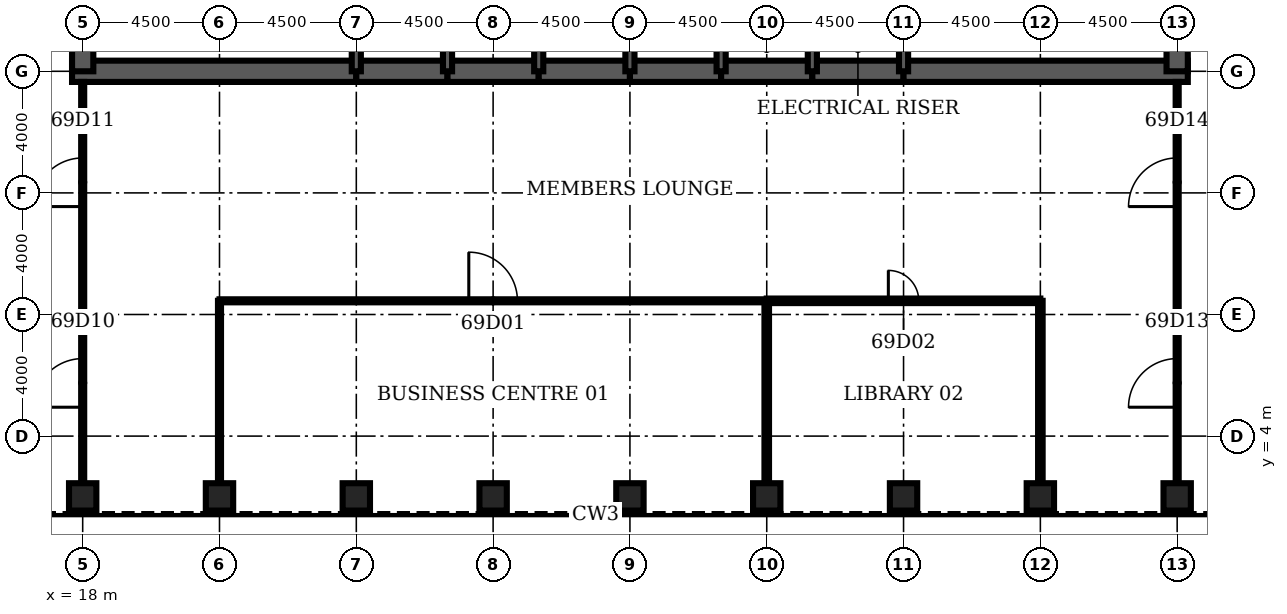
"""IFC4 building model, lengths in metres.
Left out: names, types, materials, properties, quantities, classifications, styles, units other than length and angle.
Written with IfcOpenShell. Run it as: python <this file> out.ifc"""

import sys

from ifc_helpers import new_model, si_unit, direction, frame, frame_2d, origin, origin_2d, place, context, subcontext, project, spatial, rectangle, hollow_rectangle, extrude, element, fill, save


model = new_model("IFC4")
c1 = context("Model", 3, precision=1e-05, world=origin(), true_north=direction((0.0, 1.0)))
c2 = subcontext(c1, "Body", "Model", "MODEL_VIEW")
j1 = project(units=[si_unit("LENGTHUNIT", "METRE"), si_unit("PLANEANGLEUNIT", "RADIAN")], contexts=[c1])
p1 = place(None, origin())
s1 = spatial("IfcSite", under=j1, at=p1, CompositionType="ELEMENT")
p2 = place(p1, origin())
s2 = spatial("IfcBuilding", under=s1, at=p2, CompositionType="ELEMENT")
p3 = place(p2, frame((0.0, 0.0, 304.7)))
s3 = spatial("IfcBuildingStorey", under=s2, at=p3, CompositionType="ELEMENT", Elevation=304.7)
for number, where, z_axis, x_axis in (
    (1, (18.0, 2.0, 0.0), (0.0, 0.0, 1.0), (0.0, 1.0, 0.0)),
    (2, (22.5, 2.0, 0.0), (0.0, 0.0, 1.0), (0.0, 1.0, 0.0)),
    (3, (27.0, 2.0, 0.0), (0.0, 0.0, 1.0), (0.0, 1.0, 0.0)),
    (4, (31.5, 2.0, 0.0), (0.0, 0.0, 1.0), (0.0, 1.0, 0.0)),
    (5, (36.0, 2.0, 0.0), (0.0, 0.0, 1.0), (0.0, 1.0, 0.0)),
    (6, (40.5, 2.0, 0.0), (0.0, 0.0, 1.0), (0.0, 1.0, 0.0)),
    (7, (45.0, 2.0, 0.0), (0.0, 0.0, 1.0), (0.0, 1.0, 0.0)),
    (8, (49.5, 2.0, 0.0), (0.0, 0.0, 1.0), (0.0, 1.0, 0.0)),
    (9, (54.0, 2.0, 0.0), (0.0, 0.0, 1.0), (0.0, 1.0, 0.0)),
):
    element("IfcColumn", number, at=place(p3, frame(where, z_axis=z_axis, x_axis=x_axis)), inside=s3, PredefinedType="COLUMN", context=c2, shape_type="SweptSolid", body=[
        extrude(hollow_rectangle(XDim=0.9, YDim=0.9, WallThickness=0.06, at=origin_2d()), origin(), (0.0, 0.0, 1.0), 4.2),
    ])
p4 = place(p3, frame((17.65, 16.0, 0.0), z_axis=(0.0, 0.0, 1.0), x_axis=(1.0, 0.0, 0.0)))
e10 = element("IfcWall", 10, at=p4, inside=s3, PredefinedType="SHEAR", context=c2, shape_type="SweptSolid", body=[
    extrude(rectangle(XDim=9.35, YDim=0.7, at=frame_2d((4.675, 0.0))), origin(), (0.0, 0.0, 1.0), 4.2),
])
for number, where, z_axis, x_axis in (
    (11, (27.0, 16.0, 0.0), (0.0, 0.0, 1.0), (1.0, 0.0, 0.0)),
    (12, (30.0, 16.0, 0.0), (0.0, 0.0, 1.0), (1.0, 0.0, 0.0)),
    (13, (33.0, 16.0, 0.0), (0.0, 0.0, 1.0), (1.0, 0.0, 0.0)),
    (14, (36.0, 16.0, 0.0), (0.0, 0.0, 1.0), (1.0, 0.0, 0.0)),
    (15, (39.0, 16.0, 0.0), (0.0, 0.0, 1.0), (1.0, 0.0, 0.0)),
    (16, (42.0, 16.0, 0.0), (0.0, 0.0, 1.0), (1.0, 0.0, 0.0)),
):
    element("IfcWall", number, at=place(p3, frame(where, z_axis=z_axis, x_axis=x_axis)), inside=s3, PredefinedType="SHEAR", context=c2, shape_type="SweptSolid", body=[
        extrude(rectangle(XDim=3.0, YDim=0.7, at=frame_2d((1.5, 0.0))), origin(), (0.0, 0.0, 1.0), 4.2),
    ])
p5 = place(p3, frame((45.0, 16.0, 0.0), z_axis=(0.0, 0.0, 1.0), x_axis=(1.0, 0.0, 0.0)))
e17 = element("IfcWall", 17, at=p5, inside=s3, PredefinedType="SHEAR", context=c2, shape_type="SweptSolid", body=[
    extrude(rectangle(XDim=9.35, YDim=0.7, at=frame_2d((4.675, 0.0))), origin(), (0.0, 0.0, 1.0), 4.2),
])
for number, where, z_axis, x_axis in (
    (18, (18.0, 19.2, 0.0), (0.0, 0.0, 1.0), (0.0, -1.0, 0.0)),
    (19, (54.0, 16.0, 0.0), (0.0, 0.0, 1.0), (0.0, 1.0, 0.0)),
):
    element("IfcWall", number, at=place(p3, frame(where, z_axis=z_axis, x_axis=x_axis)), inside=s3, PredefinedType="SHEAR", context=c2, shape_type="SweptSolid", body=[
        extrude(rectangle(XDim=3.2, YDim=0.7, at=frame_2d((1.6, 0.0))), origin(), (0.0, 0.0, 1.0), 4.2),
    ])
for number, where, z_axis, x_axis in (
    (20, (27.0, 16.0, 0.0), (0.0, 0.0, 1.0), (0.0, 1.0, 0.0)),
    (21, (30.0, 16.0, 0.0), (0.0, 0.0, 1.0), (0.0, 1.0, 0.0)),
    (22, (33.0, 16.0, 0.0), (0.0, 0.0, 1.0), (0.0, 1.0, 0.0)),
    (23, (36.0, 16.0, 0.0), (0.0, 0.0, 1.0), (0.0, 1.0, 0.0)),
    (24, (39.0, 16.0, 0.0), (0.0, 0.0, 1.0), (0.0, 1.0, 0.0)),
    (25, (42.0, 16.0, 0.0), (0.0, 0.0, 1.0), (0.0, 1.0, 0.0)),
    (26, (45.0, 16.0, 0.0), (0.0, 0.0, 1.0), (0.0, 1.0, 0.0)),
):
    element("IfcWall", number, at=place(p3, frame(where, z_axis=z_axis, x_axis=x_axis)), inside=s3, PredefinedType="SOLIDWALL", context=c2, shape_type="SweptSolid", body=[
        extrude(rectangle(XDim=3.2, YDim=0.3, at=frame_2d((1.6, 0.0))), origin(), (0.0, 0.0, 1.0), 4.2),
    ])
p6 = place(p3, frame((22.5, 8.45, 0.0), z_axis=(0.0, 0.0, 1.0), x_axis=(1.0, 0.0, 0.0)))
e27 = element("IfcWall", 27, at=p6, inside=s3, PredefinedType="PARTITIONING", context=c2, shape_type="SweptSolid", body=[
    extrude(rectangle(XDim=18.0, YDim=0.1, at=frame_2d((9.0, 0.0))), origin(), (0.0, 0.0, 1.0), 3.0),
])
p7 = place(p6, frame((8.2, 0.0, 0.0)))
e28 = element("IfcOpeningElement", 28, at=p7, cuts=e27, PredefinedType="OPENING", context=c2, shape_type="SweptSolid", body=[
    extrude(rectangle(XDim=1.6, YDim=2.1, at=frame_2d((0.8, 1.05))), frame((0.0, 0.06, 0.0), z_axis=(0.0, -1.0, 0.0), x_axis=(1.0, 0.0, 0.0)), (0.0, 0.0, 1.0), 0.12),
])
p8 = place(p3, frame((40.5, 8.45, 0.0), z_axis=(0.0, 0.0, 1.0), x_axis=(1.0, 0.0, 0.0)))
e29 = element("IfcWall", 29, at=p8, inside=s3, PredefinedType="PARTITIONING", context=c2, shape_type="SweptSolid", body=[
    extrude(rectangle(XDim=9.0, YDim=0.15, at=frame_2d((4.5, 0.0))), origin(), (0.0, 0.0, 1.0), 3.0),
])
p9 = place(p8, frame((4.0, 0.0, 0.0)))
e30 = element("IfcOpeningElement", 30, at=p9, cuts=e29, PredefinedType="OPENING", context=c2, shape_type="SweptSolid", body=[
    extrude(rectangle(XDim=1.0, YDim=2.1, at=frame_2d((0.5, 1.05))), frame((0.0, 0.085, 0.0), z_axis=(0.0, -1.0, 0.0), x_axis=(1.0, 0.0, 0.0)), (0.0, 0.0, 1.0), 0.17),
])
p10 = place(p3, frame((18.0, 2.45, 0.0), z_axis=(0.0, 0.0, 1.0), x_axis=(0.0, 1.0, 0.0)))
e31 = element("IfcWall", 31, at=p10, inside=s3, PredefinedType="PARTITIONING", context=c2, shape_type="SweptSolid", body=[
    extrude(rectangle(XDim=13.2, YDim=0.1, at=frame_2d((6.6, 0.0))), origin(), (0.0, 0.0, 1.0), 3.0),
])
p11 = place(p10, frame((2.5, 0.0, 0.0)))
e32 = element("IfcOpeningElement", 32, at=p11, cuts=e31, PredefinedType="OPENING", context=c2, shape_type="SweptSolid", body=[
    extrude(rectangle(XDim=1.6, YDim=2.1, at=frame_2d((0.8, 1.05))), frame((0.0, 0.06, 0.0), z_axis=(0.0, -1.0, 0.0), x_axis=(1.0, 0.0, 0.0)), (0.0, 0.0, 1.0), 0.12),
])
p12 = place(p10, frame((9.1, 0.0, 0.0)))
e33 = element("IfcOpeningElement", 33, at=p12, cuts=e31, PredefinedType="OPENING", context=c2, shape_type="SweptSolid", body=[
    extrude(rectangle(XDim=1.6, YDim=2.1, at=frame_2d((0.8, 1.05))), frame((0.0, 0.06, 0.0), z_axis=(0.0, -1.0, 0.0), x_axis=(1.0, 0.0, 0.0)), (0.0, 0.0, 1.0), 0.12),
])
p13 = place(p3, frame((22.5, 2.45, 0.0), z_axis=(0.0, 0.0, 1.0), x_axis=(0.0, 1.0, 0.0)))
e34 = element("IfcWall", 34, at=p13, inside=s3, PredefinedType="PARTITIONING", context=c2, shape_type="SweptSolid", body=[
    extrude(rectangle(XDim=6.0, YDim=0.1, at=frame_2d((3.0, 0.0))), origin(), (0.0, 0.0, 1.0), 3.0),
])
for number, where, z_axis, x_axis in (
    (35, (40.5, 2.45, 0.0), (0.0, 0.0, 1.0), (0.0, 1.0, 0.0)),
    (36, (49.5, 2.45, 0.0), (0.0, 0.0, 1.0), (0.0, 1.0, 0.0)),
):
    element("IfcWall", number, at=place(p3, frame(where, z_axis=z_axis, x_axis=x_axis)), inside=s3, PredefinedType="PARTITIONING", context=c2, shape_type="SweptSolid", body=[
        extrude(rectangle(XDim=6.0, YDim=0.15, at=frame_2d((3.0, 0.0))), origin(), (0.0, 0.0, 1.0), 3.0),
    ])
p14 = place(p3, frame((54.0, 2.45, 0.0), z_axis=(0.0, 0.0, 1.0), x_axis=(0.0, 1.0, 0.0)))
e37 = element("IfcWall", 37, at=p14, inside=s3, PredefinedType="PARTITIONING", context=c2, shape_type="SweptSolid", body=[
    extrude(rectangle(XDim=13.2, YDim=0.1, at=frame_2d((6.6, 0.0))), origin(), (0.0, 0.0, 1.0), 3.0),
])
p15 = place(p14, frame((2.5, 0.0, 0.0)))
e38 = element("IfcOpeningElement", 38, at=p15, cuts=e37, PredefinedType="OPENING", context=c2, shape_type="SweptSolid", body=[
    extrude(rectangle(XDim=1.6, YDim=2.1, at=frame_2d((0.8, 1.05))), frame((0.0, 0.06, 0.0), z_axis=(0.0, -1.0, 0.0), x_axis=(1.0, 0.0, 0.0)), (0.0, 0.0, 1.0), 0.12),
])
p16 = place(p14, frame((9.1, 0.0, 0.0)))
e39 = element("IfcOpeningElement", 39, at=p16, cuts=e37, PredefinedType="OPENING", context=c2, shape_type="SweptSolid", body=[
    extrude(rectangle(XDim=1.6, YDim=2.1, at=frame_2d((0.8, 1.05))), frame((0.0, 0.06, 0.0), z_axis=(0.0, -1.0, 0.0), x_axis=(1.0, 0.0, 0.0)), (0.0, 0.0, 1.0), 0.12),
])
p17 = place(p7, origin())
e40 = element("IfcDoor", 40, at=p17, inside=s3, OperationType="SINGLE_SWING_LEFT", PredefinedType="DOOR", context=c2, shape_type="SweptSolid", body=[
    extrude(rectangle(XDim=1.6, YDim=2.1, at=frame_2d((0.8, 1.05))), frame((0.0, 0.025, 0.0), z_axis=(0.0, -1.0, 0.0), x_axis=(1.0, 0.0, 0.0)), (0.0, 0.0, 1.0), 0.05),
])
fill(e28, e40)
p18 = place(p9, origin())
e41 = element("IfcDoor", 41, at=p18, inside=s3, OperationType="SINGLE_SWING_LEFT", PredefinedType="DOOR", context=c2, shape_type="SweptSolid", body=[
    extrude(rectangle(XDim=1.0, YDim=2.1, at=frame_2d((0.5, 1.05))), frame((0.0, 0.025, 0.0), z_axis=(0.0, -1.0, 0.0), x_axis=(1.0, 0.0, 0.0)), (0.0, 0.0, 1.0), 0.05),
])
fill(e30, e41)
p19 = place(p11, origin())
e42 = element("IfcDoor", 42, at=p19, inside=s3, OperationType="SINGLE_SWING_LEFT", PredefinedType="DOOR", context=c2, shape_type="SweptSolid", body=[
    extrude(rectangle(XDim=1.6, YDim=2.1, at=frame_2d((0.8, 1.05))), frame((0.0, 0.025, 0.0), z_axis=(0.0, -1.0, 0.0), x_axis=(1.0, 0.0, 0.0)), (0.0, 0.0, 1.0), 0.05),
])
fill(e32, e42)
p20 = place(p12, origin())
e43 = element("IfcDoor", 43, at=p20, inside=s3, OperationType="SINGLE_SWING_LEFT", PredefinedType="DOOR", context=c2, shape_type="SweptSolid", body=[
    extrude(rectangle(XDim=1.6, YDim=2.1, at=frame_2d((0.8, 1.05))), frame((0.0, 0.025, 0.0), z_axis=(0.0, -1.0, 0.0), x_axis=(1.0, 0.0, 0.0)), (0.0, 0.0, 1.0), 0.05),
])
fill(e33, e43)
p21 = place(p15, origin())
e44 = element("IfcDoor", 44, at=p21, inside=s3, OperationType="SINGLE_SWING_LEFT", PredefinedType="DOOR", context=c2, shape_type="SweptSolid", body=[
    extrude(rectangle(XDim=1.6, YDim=2.1, at=frame_2d((0.8, 1.05))), frame((0.0, 0.025, 0.0), z_axis=(0.0, -1.0, 0.0), x_axis=(1.0, 0.0, 0.0)), (0.0, 0.0, 1.0), 0.05),
])
fill(e38, e44)
p22 = place(p16, origin())
e45 = element("IfcDoor", 45, at=p22, inside=s3, OperationType="SINGLE_SWING_LEFT", PredefinedType="DOOR", context=c2, shape_type="SweptSolid", body=[
    extrude(rectangle(XDim=1.6, YDim=2.1, at=frame_2d((0.8, 1.05))), frame((0.0, 0.025, 0.0), z_axis=(0.0, -1.0, 0.0), x_axis=(1.0, 0.0, 0.0)), (0.0, 0.0, 1.0), 0.05),
])
fill(e39, e45)
save(model, sys.argv[1])
